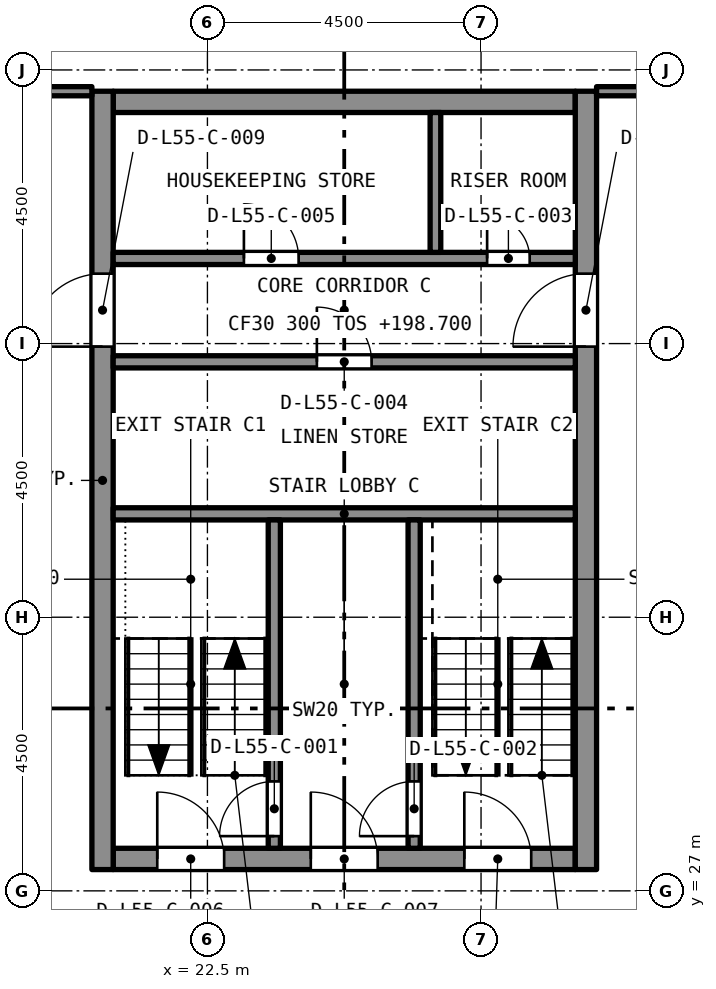
"""IFC4 building model, lengths in metres.
Left out: names, types, materials, properties, quantities, classifications, styles, units other than length and angle.
Written with IfcOpenShell. Run it as: python <this file> out.ifc"""

import sys

from ifc_helpers import new_model, si_unit, direction, frame, frame_2d, origin, place, context, subcontext, project, spatial, rectangle, extrude, element, fill, save


model = new_model("IFC4")
c1 = context("Model", 3, precision=1e-05, world=origin(), true_north=direction((0.0, 1.0)))
c2 = subcontext(c1, "Body", "Model", "MODEL_VIEW")
j1 = project(units=[si_unit("LENGTHUNIT", "METRE"), si_unit("PLANEANGLEUNIT", "RADIAN")], contexts=[c1])
p1 = place(None, origin())
s1 = spatial("IfcSite", under=j1, at=p1, CompositionType="ELEMENT")
p2 = place(p1, origin())
s2 = spatial("IfcBuilding", under=s1, at=p2, CompositionType="ELEMENT")
p3 = place(p2, frame((0.0, 0.0, 198.7)))
s3 = spatial("IfcBuildingStorey", under=s2, at=p3, CompositionType="ELEMENT", Elevation=198.7)
p4 = place(p3, frame((20.95, 27.525, 0.0), z_axis=(0.0, 0.0, 1.0), x_axis=(1.0, 0.0, 0.0)))
e1 = element("IfcWall", 1, at=p4, inside=s3, PredefinedType="SOLIDWALL", context=c2, shape_type="SweptSolid", body=[
    extrude(rectangle(XDim=7.6, YDim=0.35, at=frame_2d((3.8, 0.0))), origin(), (0.0, 0.0, 1.0), 3.2),
])
p5 = place(p4, frame((0.725, 0.0, 0.0)))
e2 = element("IfcOpeningElement", 2, at=p5, cuts=e1, PredefinedType="OPENING", context=c2, shape_type="SweptSolid", body=[
    extrude(rectangle(XDim=1.1, YDim=2.1, at=frame_2d((0.55, 1.05))), frame((0.0, 0.185, 0.0), z_axis=(0.0, -1.0, 0.0), x_axis=(1.0, 0.0, 0.0)), (0.0, 0.0, 1.0), 0.37),
])
p6 = place(p4, frame((3.25, 0.0, 0.0)))
e3 = element("IfcOpeningElement", 3, at=p6, cuts=e1, PredefinedType="OPENING", context=c2, shape_type="SweptSolid", body=[
    extrude(rectangle(XDim=1.1, YDim=2.1, at=frame_2d((0.55, 1.05))), frame((0.0, 0.185, 0.0), z_axis=(0.0, -1.0, 0.0), x_axis=(1.0, 0.0, 0.0)), (0.0, 0.0, 1.0), 0.37),
])
p7 = place(p4, frame((5.775, 0.0, 0.0)))
e4 = element("IfcOpeningElement", 4, at=p7, cuts=e1, PredefinedType="OPENING", context=c2, shape_type="SweptSolid", body=[
    extrude(rectangle(XDim=1.1, YDim=2.1, at=frame_2d((0.55, 1.05))), frame((0.0, 0.185, 0.0), z_axis=(0.0, -1.0, 0.0), x_axis=(1.0, 0.0, 0.0)), (0.0, 0.0, 1.0), 0.37),
])
p8 = place(p3, frame((20.95, 39.975, 0.0), z_axis=(0.0, 0.0, 1.0), x_axis=(1.0, 0.0, 0.0)))
e5 = element("IfcWall", 5, at=p8, inside=s3, PredefinedType="SOLIDWALL", context=c2, shape_type="SweptSolid", body=[
    extrude(rectangle(XDim=7.6, YDim=0.35, at=frame_2d((3.8, 0.0))), origin(), (0.0, 0.0, 1.0), 3.2),
])
p9 = place(p3, frame((20.775, 27.35, 0.0), z_axis=(0.0, 0.0, 1.0), x_axis=(0.0, 1.0, 0.0)))
e6 = element("IfcWall", 6, at=p9, inside=s3, PredefinedType="SOLIDWALL", context=c2, shape_type="SweptSolid", body=[
    extrude(rectangle(XDim=12.8, YDim=0.35, at=frame_2d((6.4, 0.0))), origin(), (0.0, 0.0, 1.0), 3.2),
])
p10 = place(p9, frame((8.6, 0.0, 0.0)))
e7 = element("IfcOpeningElement", 7, at=p10, cuts=e6, PredefinedType="OPENING", context=c2, shape_type="SweptSolid", body=[
    extrude(rectangle(XDim=1.2, YDim=2.1, at=frame_2d((0.6, 1.05))), frame((0.0, 0.185, 0.0), z_axis=(0.0, -1.0, 0.0), x_axis=(1.0, 0.0, 0.0)), (0.0, 0.0, 1.0), 0.37),
])
p11 = place(p3, frame((28.725, 27.35, 0.0), z_axis=(0.0, 0.0, 1.0), x_axis=(0.0, 1.0, 0.0)))
e8 = element("IfcWall", 8, at=p11, inside=s3, PredefinedType="SOLIDWALL", context=c2, shape_type="SweptSolid", body=[
    extrude(rectangle(XDim=12.8, YDim=0.35, at=frame_2d((6.4, 0.0))), origin(), (0.0, 0.0, 1.0), 3.2),
])
p12 = place(p11, frame((8.6, 0.0, 0.0)))
e9 = element("IfcOpeningElement", 9, at=p12, cuts=e8, PredefinedType="OPENING", context=c2, shape_type="SweptSolid", body=[
    extrude(rectangle(XDim=1.2, YDim=2.1, at=frame_2d((0.6, 1.05))), frame((0.0, 0.185, 0.0), z_axis=(0.0, -1.0, 0.0), x_axis=(1.0, 0.0, 0.0)), (0.0, 0.0, 1.0), 0.37),
])
p13 = place(p3, frame((18.4, 40.15, 0.0), z_axis=(0.0, 0.0, 1.0), x_axis=(1.0, 0.0, 0.0)))
e10 = element("IfcWall", 10, at=p13, inside=s3, PredefinedType="PARTITIONING", context=c2, shape_type="SweptSolid", body=[
    extrude(rectangle(XDim=2.2, YDim=0.15, at=frame_2d((1.1, 0.0))), origin(), (0.0, 0.0, 1.0), 2.7),
])
p14 = place(p13, frame((0.2, 0.0, 0.0)))
e11 = element("IfcOpeningElement", 11, at=p14, cuts=e10, PredefinedType="OPENING", context=c2, shape_type="SweptSolid", body=[
    extrude(rectangle(XDim=1.0, YDim=2.1, at=frame_2d((0.5, 1.05))), frame((0.0, 0.085, 0.0), z_axis=(0.0, -1.0, 0.0), x_axis=(1.0, 0.0, 0.0)), (0.0, 0.0, 1.0), 0.17),
])
p15 = place(p3, frame((28.9, 40.15, 0.0), z_axis=(0.0, 0.0, 1.0), x_axis=(1.0, 0.0, 0.0)))
e12 = element("IfcWall", 12, at=p15, inside=s3, PredefinedType="PARTITIONING", context=c2, shape_type="SweptSolid", body=[
    extrude(rectangle(XDim=2.2, YDim=0.15, at=frame_2d((1.1, 0.0))), origin(), (0.0, 0.0, 1.0), 2.7),
])
p16 = place(p3, frame((20.95, 33.2, 0.0), z_axis=(0.0, 0.0, 1.0), x_axis=(1.0, 0.0, 0.0)))
e13 = element("IfcWall", 13, at=p16, inside=s3, PredefinedType="SOLIDWALL", context=c2, shape_type="SweptSolid", body=[
    extrude(rectangle(XDim=7.6, YDim=0.2, at=frame_2d((3.8, 0.0))), origin(), (0.0, 0.0, 1.0), 2.7),
])
p17 = place(p3, frame((20.95, 35.7, 0.0), z_axis=(0.0, 0.0, 1.0), x_axis=(1.0, 0.0, 0.0)))
e14 = element("IfcWall", 14, at=p17, inside=s3, PredefinedType="SOLIDWALL", context=c2, shape_type="SweptSolid", body=[
    extrude(rectangle(XDim=7.6, YDim=0.2, at=frame_2d((3.8, 0.0))), origin(), (0.0, 0.0, 1.0), 2.7),
])
p18 = place(p17, frame((3.35, 0.0, 0.0)))
e15 = element("IfcOpeningElement", 15, at=p18, cuts=e14, PredefinedType="OPENING", context=c2, shape_type="SweptSolid", body=[
    extrude(rectangle(XDim=0.9, YDim=2.1, at=frame_2d((0.45, 1.05))), frame((0.0, 0.11, 0.0), z_axis=(0.0, -1.0, 0.0), x_axis=(1.0, 0.0, 0.0)), (0.0, 0.0, 1.0), 0.22),
])
p19 = place(p3, frame((20.95, 37.4, 0.0), z_axis=(0.0, 0.0, 1.0), x_axis=(1.0, 0.0, 0.0)))
e16 = element("IfcWall", 16, at=p19, inside=s3, PredefinedType="SOLIDWALL", context=c2, shape_type="SweptSolid", body=[
    extrude(rectangle(XDim=7.6, YDim=0.2, at=frame_2d((3.8, 0.0))), origin(), (0.0, 0.0, 1.0), 2.7),
])
p20 = place(p19, frame((6.15, 0.0, 0.0)))
e17 = element("IfcOpeningElement", 17, at=p20, cuts=e16, PredefinedType="OPENING", context=c2, shape_type="SweptSolid", body=[
    extrude(rectangle(XDim=0.7, YDim=2.1, at=frame_2d((0.35, 1.05))), frame((0.0, 0.11, 0.0), z_axis=(0.0, -1.0, 0.0), x_axis=(1.0, 0.0, 0.0)), (0.0, 0.0, 1.0), 0.22),
])
p21 = place(p19, frame((2.15, 0.0, 0.0)))
e18 = element("IfcOpeningElement", 18, at=p21, cuts=e16, PredefinedType="OPENING", context=c2, shape_type="SweptSolid", body=[
    extrude(rectangle(XDim=0.9, YDim=2.1, at=frame_2d((0.45, 1.05))), frame((0.0, 0.11, 0.0), z_axis=(0.0, -1.0, 0.0), x_axis=(1.0, 0.0, 0.0)), (0.0, 0.0, 1.0), 0.22),
])
p22 = place(p3, frame((23.6, 27.7, 0.0), z_axis=(0.0, 0.0, 1.0), x_axis=(0.0, 1.0, 0.0)))
e19 = element("IfcWall", 19, at=p22, inside=s3, PredefinedType="SOLIDWALL", context=c2, shape_type="SweptSolid", body=[
    extrude(rectangle(XDim=5.4, YDim=0.2, at=frame_2d((2.7, 0.0))), origin(), (0.0, 0.0, 1.0), 2.7),
])
p23 = place(p22, frame((0.2, 0.0, 0.0)))
e20 = element("IfcOpeningElement", 20, at=p23, cuts=e19, PredefinedType="OPENING", context=c2, shape_type="SweptSolid", body=[
    extrude(rectangle(XDim=0.9, YDim=2.1, at=frame_2d((0.45, 1.05))), frame((0.0, 0.11, 0.0), z_axis=(0.0, -1.0, 0.0), x_axis=(1.0, 0.0, 0.0)), (0.0, 0.0, 1.0), 0.22),
])
p24 = place(p3, frame((25.9, 27.7, 0.0), z_axis=(0.0, 0.0, 1.0), x_axis=(0.0, 1.0, 0.0)))
e21 = element("IfcWall", 21, at=p24, inside=s3, PredefinedType="SOLIDWALL", context=c2, shape_type="SweptSolid", body=[
    extrude(rectangle(XDim=5.4, YDim=0.2, at=frame_2d((2.7, 0.0))), origin(), (0.0, 0.0, 1.0), 2.7),
])
p25 = place(p24, frame((0.2, 0.0, 0.0)))
e22 = element("IfcOpeningElement", 22, at=p25, cuts=e21, PredefinedType="OPENING", context=c2, shape_type="SweptSolid", body=[
    extrude(rectangle(XDim=0.9, YDim=2.1, at=frame_2d((0.45, 1.05))), frame((0.0, 0.11, 0.0), z_axis=(0.0, -1.0, 0.0), x_axis=(1.0, 0.0, 0.0)), (0.0, 0.0, 1.0), 0.22),
])
p26 = place(p3, frame((26.25, 37.5, 0.0), z_axis=(0.0, 0.0, 1.0), x_axis=(0.0, 1.0, 0.0)))
e23 = element("IfcWall", 23, at=p26, inside=s3, PredefinedType="SOLIDWALL", context=c2, shape_type="SweptSolid", body=[
    extrude(rectangle(XDim=2.3, YDim=0.175, at=frame_2d((1.15, 0.0))), origin(), (0.0, 0.0, 1.0), 2.7),
])
p27 = place(p23, origin())
e24 = element("IfcDoor", 24, at=p27, inside=s3, OperationType="SINGLE_SWING_LEFT", PredefinedType="DOOR", context=c2, shape_type="SweptSolid", body=[
    extrude(rectangle(XDim=0.9, YDim=2.1, at=frame_2d((0.45, 1.05))), frame((0.0, 0.025, 0.0), z_axis=(0.0, -1.0, 0.0), x_axis=(1.0, 0.0, 0.0)), (0.0, 0.0, 1.0), 0.05),
])
fill(e20, e24)
p28 = place(p25, origin())
e25 = element("IfcDoor", 25, at=p28, inside=s3, OperationType="SINGLE_SWING_LEFT", PredefinedType="DOOR", context=c2, shape_type="SweptSolid", body=[
    extrude(rectangle(XDim=0.9, YDim=2.1, at=frame_2d((0.45, 1.05))), frame((0.0, 0.025, 0.0), z_axis=(0.0, -1.0, 0.0), x_axis=(1.0, 0.0, 0.0)), (0.0, 0.0, 1.0), 0.05),
])
fill(e22, e25)
p29 = place(p20, origin())
e26 = element("IfcDoor", 26, at=p29, inside=s3, OperationType="SINGLE_SWING_LEFT", PredefinedType="DOOR", context=c2, shape_type="SweptSolid", body=[
    extrude(rectangle(XDim=0.7, YDim=2.1, at=frame_2d((0.35, 1.05))), frame((0.0, 0.025, 0.0), z_axis=(0.0, -1.0, 0.0), x_axis=(1.0, 0.0, 0.0)), (0.0, 0.0, 1.0), 0.05),
])
fill(e17, e26)
p30 = place(p18, origin())
e27 = element("IfcDoor", 27, at=p30, inside=s3, OperationType="SINGLE_SWING_LEFT", PredefinedType="DOOR", context=c2, shape_type="SweptSolid", body=[
    extrude(rectangle(XDim=0.9, YDim=2.1, at=frame_2d((0.45, 1.05))), frame((0.0, 0.025, 0.0), z_axis=(0.0, -1.0, 0.0), x_axis=(1.0, 0.0, 0.0)), (0.0, 0.0, 1.0), 0.05),
])
fill(e15, e27)
p31 = place(p21, origin())
e28 = element("IfcDoor", 28, at=p31, inside=s3, OperationType="SINGLE_SWING_LEFT", PredefinedType="DOOR", context=c2, shape_type="SweptSolid", body=[
    extrude(rectangle(XDim=0.9, YDim=2.1, at=frame_2d((0.45, 1.05))), frame((0.0, 0.025, 0.0), z_axis=(0.0, -1.0, 0.0), x_axis=(1.0, 0.0, 0.0)), (0.0, 0.0, 1.0), 0.05),
])
fill(e18, e28)
p32 = place(p5, origin())
e29 = element("IfcDoor", 29, at=p32, inside=s3, OperationType="SINGLE_SWING_LEFT", PredefinedType="DOOR", context=c2, shape_type="SweptSolid", body=[
    extrude(rectangle(XDim=1.1, YDim=2.1, at=frame_2d((0.55, 1.05))), frame((0.0, 0.025, 0.0), z_axis=(0.0, -1.0, 0.0), x_axis=(1.0, 0.0, 0.0)), (0.0, 0.0, 1.0), 0.05),
])
fill(e2, e29)
p33 = place(p6, origin())
e30 = element("IfcDoor", 30, at=p33, inside=s3, OperationType="SINGLE_SWING_LEFT", PredefinedType="DOOR", context=c2, shape_type="SweptSolid", body=[
    extrude(rectangle(XDim=1.1, YDim=2.1, at=frame_2d((0.55, 1.05))), frame((0.0, 0.025, 0.0), z_axis=(0.0, -1.0, 0.0), x_axis=(1.0, 0.0, 0.0)), (0.0, 0.0, 1.0), 0.05),
])
fill(e3, e30)
p34 = place(p7, origin())
e31 = element("IfcDoor", 31, at=p34, inside=s3, OperationType="SINGLE_SWING_LEFT", PredefinedType="DOOR", context=c2, shape_type="SweptSolid", body=[
    extrude(rectangle(XDim=1.1, YDim=2.1, at=frame_2d((0.55, 1.05))), frame((0.0, 0.025, 0.0), z_axis=(0.0, -1.0, 0.0), x_axis=(1.0, 0.0, 0.0)), (0.0, 0.0, 1.0), 0.05),
])
fill(e4, e31)
p35 = place(p10, origin())
e32 = element("IfcDoor", 32, at=p35, inside=s3, OperationType="SINGLE_SWING_LEFT", PredefinedType="DOOR", context=c2, shape_type="SweptSolid", body=[
    extrude(rectangle(XDim=1.2, YDim=2.1, at=frame_2d((0.6, 1.05))), frame((0.0, 0.025, 0.0), z_axis=(0.0, -1.0, 0.0), x_axis=(1.0, 0.0, 0.0)), (0.0, 0.0, 1.0), 0.05),
])
fill(e7, e32)
p36 = place(p12, origin())
e33 = element("IfcDoor", 33, at=p36, inside=s3, OperationType="SINGLE_SWING_LEFT", PredefinedType="DOOR", context=c2, shape_type="SweptSolid", body=[
    extrude(rectangle(XDim=1.2, YDim=2.1, at=frame_2d((0.6, 1.05))), frame((0.0, 0.025, 0.0), z_axis=(0.0, -1.0, 0.0), x_axis=(1.0, 0.0, 0.0)), (0.0, 0.0, 1.0), 0.05),
])
fill(e9, e33)
save(model, sys.argv[1])
